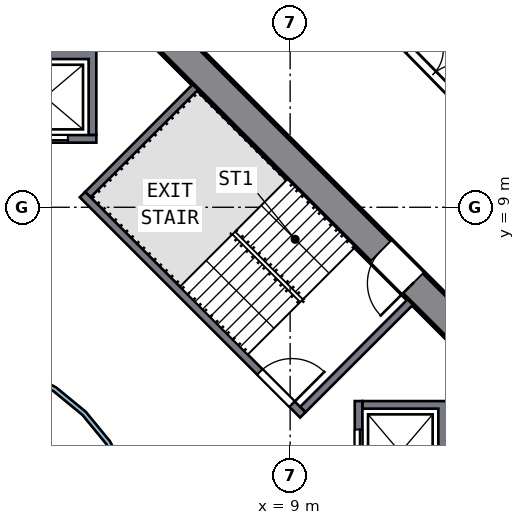
"""IFC4 building model, lengths in metres.
Left out: names, types, materials, properties, quantities, classifications, styles, units other than length and angle.
Written with IfcOpenShell. Run it as: python <this file> out.ifc"""

import sys

from ifc_helpers import new_model, si_unit, direction, frame, frame_2d, origin, place, context, subcontext, project, spatial, polyline, rectangle, outline, extrude, element, fill, save


model = new_model("IFC4")
c1 = context("Model", 3, precision=1e-05, world=origin(), true_north=direction((0.0, 1.0)))
c2 = subcontext(c1, "Body", "Model", "MODEL_VIEW")
j1 = project(units=[si_unit("LENGTHUNIT", "METRE"), si_unit("PLANEANGLEUNIT", "RADIAN")], contexts=[c1])
p1 = place(None, origin())
s1 = spatial("IfcSite", under=j1, at=p1, CompositionType="ELEMENT")
p2 = place(p1, origin())
s2 = spatial("IfcBuilding", under=s1, at=p2, CompositionType="ELEMENT")
p3 = place(p2, frame((0.0, 0.0, 93.0)))
s3 = spatial("IfcBuildingStorey", under=s2, at=p3, CompositionType="ELEMENT", Elevation=93.0)
p4 = place(p3, frame((13.717, 5.516, 0.0), z_axis=(0.0, 0.0, 1.0), x_axis=(-0.707106781, 0.707106781, 0.0)))
e1 = element("IfcWall", 1, at=p4, inside=s3, PredefinedType="SHEAR", context=c2, shape_type="SweptSolid", body=[
    extrude(rectangle(XDim=11.598, YDim=0.8, at=frame_2d((5.799, 0.0))), origin(), (0.0, 0.0, 1.0), 3.5),
])
p5 = place(p4, frame((2.099, 0.0, 0.0)))
e2 = element("IfcOpeningElement", 2, at=p5, cuts=e1, PredefinedType="OPENING", context=c2, shape_type="SweptSolid", body=[
    extrude(rectangle(XDim=1.2, YDim=2.1, at=frame_2d((0.6, 1.05))), frame((0.0, 0.41, 0.0), z_axis=(0.0, -1.0, 0.0), x_axis=(1.0, 0.0, 0.0)), (0.0, 0.0, 1.0), 0.82),
])
p6 = place(p3, frame((8.211, 17.139, 0.0), z_axis=(0.0, 0.0, 1.0), x_axis=(0.699668735, -0.714467397, 0.0)))
e3 = element("IfcWall", 3, at=p6, inside=s3, PredefinedType="SOLIDWALL", context=c2, shape_type="SweptSolid", body=[
    extrude(rectangle(XDim=13.0, YDim=0.2, at=frame_2d((6.5, 0.0))), origin(), (0.0, 0.0, 1.0), 3.19),
])
p7 = place(p6, frame((5.6, 0.0, 0.0)))
e4 = element("IfcOpeningElement", 4, at=p7, cuts=e3, PredefinedType="OPENING", context=c2, shape_type="SweptSolid", body=[
    extrude(rectangle(XDim=1.8, YDim=2.4, at=frame_2d((0.9, 1.2))), frame((0.0, 0.11, 0.0), z_axis=(0.0, -1.0, 0.0), x_axis=(1.0, 0.0, 0.0)), (0.0, 0.0, 1.0), 0.22),
])
p8 = place(p3, frame((21.788, 12.351, 0.0), z_axis=(0.0, 0.0, 1.0), x_axis=(-0.699662003, 0.71447399, 0.0)))
e5 = element("IfcWall", 5, at=p8, inside=s3, PredefinedType="SOLIDWALL", context=c2, shape_type="SweptSolid", body=[
    extrude(rectangle(XDim=12.84, YDim=0.1, at=frame_2d((6.42, 0.0))), origin(), (0.0, 0.0, 1.0), 0.7),
])
p9 = place(p3, origin())
e6 = element("IfcWall", 6, at=p9, inside=s3, PredefinedType="SOLIDWALL", context=c2, shape_type="SweptSolid", body=[
    extrude(outline(polyline([(13.2, 3.9), (13.2, 1.2), (10.9, 1.2), (10.9, 1.4), (12.9, 1.4), (12.9, 3.7), (10.9, 3.7), (10.9, 3.9), (13.2, 3.9)])), origin(), (0.0, 0.0, 1.0), 3.19),
])
p10 = place(p3, frame((10.8, 1.2, 0.0), z_axis=(0.0, 0.0, 1.0), x_axis=(0.0, 1.0, 0.0)))
e7 = element("IfcWall", 7, at=p10, inside=s3, PredefinedType="SOLIDWALL", context=c2, shape_type="SweptSolid", body=[
    extrude(rectangle(XDim=2.7, YDim=0.2, at=frame_2d((1.35, 0.0))), origin(), (0.0, 0.0, 1.0), 3.19),
])
p11 = place(p10, frame((0.75, 0.0, 0.0)))
e8 = element("IfcOpeningElement", 8, at=p11, cuts=e7, PredefinedType="OPENING", context=c2, shape_type="SweptSolid", body=[
    extrude(rectangle(XDim=1.2, YDim=2.1, at=frame_2d((0.6, 1.05))), frame((0.0, 0.11, 0.0), z_axis=(0.0, -1.0, 0.0), x_axis=(1.0, 0.0, 0.0)), (0.0, 0.0, 1.0), 0.22),
])
p12 = place(p3, origin())
e9 = element("IfcWall", 9, at=p12, inside=s3, PredefinedType="SOLIDWALL", context=c2, shape_type="SweptSolid", body=[
    extrude(outline(polyline([(3.9, 13.2), (3.9, 10.9), (3.7, 10.9), (3.7, 12.9), (1.4, 12.9), (1.4, 10.9), (1.2, 10.9), (1.2, 13.2), (3.9, 13.2)])), origin(), (0.0, 0.0, 1.0), 3.19),
])
p13 = place(p3, frame((1.2, 10.8, 0.0), z_axis=(0.0, 0.0, 1.0), x_axis=(1.0, 0.0, 0.0)))
e10 = element("IfcWall", 10, at=p13, inside=s3, PredefinedType="SOLIDWALL", context=c2, shape_type="SweptSolid", body=[
    extrude(rectangle(XDim=2.7, YDim=0.2, at=frame_2d((1.35, 0.0))), origin(), (0.0, 0.0, 1.0), 3.19),
])
p14 = place(p13, frame((0.75, 0.0, 0.0)))
e11 = element("IfcOpeningElement", 11, at=p14, cuts=e10, PredefinedType="OPENING", context=c2, shape_type="SweptSolid", body=[
    extrude(rectangle(XDim=1.2, YDim=2.1, at=frame_2d((0.6, 1.05))), frame((0.0, 0.11, 0.0), z_axis=(0.0, -1.0, 0.0), x_axis=(1.0, 0.0, 0.0)), (0.0, 0.0, 1.0), 0.22),
])
p15 = place(p3, frame((3.535, 9.334, 0.0), z_axis=(0.0, 0.0, 1.0), x_axis=(0.707106781, -0.707106781, 0.0)))
e12 = element("IfcWall", 12, at=p15, inside=s3, PredefinedType="SOLIDWALL", context=c2, shape_type="SweptSolid", body=[
    extrude(rectangle(XDim=8.2, YDim=0.2, at=frame_2d((4.1, 0.0))), origin(), (0.0, 0.0, 1.0), 3.19),
])
p16 = place(p15, frame((6.6, 0.0, 0.0)))
e13 = element("IfcOpeningElement", 13, at=p16, cuts=e12, PredefinedType="OPENING", context=c2, shape_type="SweptSolid", body=[
    extrude(rectangle(XDim=1.2, YDim=2.1, at=frame_2d((0.6, 1.05))), frame((0.0, 0.11, 0.0), z_axis=(0.0, -1.0, 0.0), x_axis=(1.0, 0.0, 0.0)), (0.0, 0.0, 1.0), 0.22),
])
for number, where, z_axis, x_axis in (
    (14, (9.334, 3.677, 0.0), (0.0, 0.0, 1.0), (0.707, 0.707, 0.0)),
    (15, (3.677, 9.334, 0.0), (0.0, 0.0, 1.0), (0.707, 0.707, 0.0)),
):
    element("IfcWall", number, at=place(p3, frame(where, z_axis=z_axis, x_axis=x_axis)), inside=s3, PredefinedType="SOLIDWALL", context=c2, shape_type="SweptSolid", body=[
        extrude(rectangle(XDim=4.0, YDim=0.2, at=frame_2d((2.0, 0.0))), origin(), (0.0, 0.0, 1.0), 3.19),
    ])
p17 = place(p3, origin())
e16 = element("IfcWall", 16, at=p17, inside=s3, PredefinedType="SOLIDWALL", context=c2, shape_type="SweptSolid", body=[
    extrude(outline(polyline([(5.021, -0.999), (4.73, -1.959), (4.257, -2.844), (3.62, -3.62), (2.844, -4.257), (1.959, -4.73), (0.999, -5.021), (0.0, -5.12), (-0.999, -5.021), (-1.959, -4.73), (-2.844, -4.257), (-3.62, -3.62), (-4.257, -2.844), (-4.73, -1.959), (-5.021, -0.999), (-5.12, 0.0), (-5.021, 0.999), (-4.73, 1.959), (-4.257, 2.844), (-3.62, 3.62), (-2.844, 4.257), (-1.959, 4.73), (-0.999, 5.021), (0.0, 5.12), (0.999, 5.021), (1.959, 4.73), (2.844, 4.257), (3.62, 3.62), (4.257, 2.844), (4.73, 1.959), (5.021, 0.999), (5.12, 0.0), (5.021, -0.999)]), holes=[polyline([(4.904, 0.976), (4.619, 1.913), (4.157, 2.778), (3.535, 3.535), (2.778, 4.157), (1.913, 4.619), (0.976, 4.904), (0.0, 5.0), (-0.976, 4.904), (-1.913, 4.619), (-2.778, 4.157), (-3.535, 3.535), (-4.157, 2.778), (-4.619, 1.913), (-4.904, 0.976), (-5.0, 0.0), (-4.904, -0.976), (-4.619, -1.913), (-4.157, -2.778), (-3.535, -3.535), (-2.778, -4.157), (-1.913, -4.619), (-0.976, -4.904), (0.0, -5.0), (0.976, -4.904), (1.913, -4.619), (2.778, -4.157), (3.535, -3.535), (4.157, -2.778), (4.619, -1.913), (4.904, -0.976), (5.0, 0.0), (4.904, 0.976)])]), origin(), (0.0, 0.0, 1.0), 3.19),
])
p18 = place(p7, origin())
e17 = element("IfcDoor", 17, at=p18, inside=s3, OperationType="DOUBLE_DOOR_SINGLE_SWING", PredefinedType="DOOR", context=c2, shape_type="SweptSolid", body=[
    extrude(rectangle(XDim=1.8, YDim=2.4, at=frame_2d((0.9, 1.2))), frame((0.0, 0.025, 0.0), z_axis=(0.0, -1.0, 0.0), x_axis=(1.0, 0.0, 0.0)), (0.0, 0.0, 1.0), 0.05),
])
fill(e4, e17)
p19 = place(p11, origin())
e18 = element("IfcDoor", 18, at=p19, inside=s3, OperationType="DOUBLE_DOOR_SLIDING", PredefinedType="DOOR", context=c2, shape_type="SweptSolid", body=[
    extrude(rectangle(XDim=1.2, YDim=2.1, at=frame_2d((0.6, 1.05))), frame((0.0, 0.025, 0.0), z_axis=(0.0, -1.0, 0.0), x_axis=(1.0, 0.0, 0.0)), (0.0, 0.0, 1.0), 0.05),
])
fill(e8, e18)
p20 = place(p14, origin())
e19 = element("IfcDoor", 19, at=p20, inside=s3, OperationType="DOUBLE_DOOR_SLIDING", PredefinedType="DOOR", context=c2, shape_type="SweptSolid", body=[
    extrude(rectangle(XDim=1.2, YDim=2.1, at=frame_2d((0.6, 1.05))), frame((0.0, 0.025, 0.0), z_axis=(0.0, -1.0, 0.0), x_axis=(1.0, 0.0, 0.0)), (0.0, 0.0, 1.0), 0.05),
])
fill(e11, e19)
p21 = place(p16, origin())
e20 = element("IfcDoor", 20, at=p21, inside=s3, OperationType="SINGLE_SWING_RIGHT", PredefinedType="DOOR", context=c2, shape_type="SweptSolid", body=[
    extrude(rectangle(XDim=1.2, YDim=2.1, at=frame_2d((0.6, 1.05))), frame((0.0, 0.025, 0.0), z_axis=(0.0, -1.0, 0.0), x_axis=(1.0, 0.0, 0.0)), (0.0, 0.0, 1.0), 0.05),
])
fill(e13, e20)
p22 = place(p5, origin())
e21 = element("IfcDoor", 21, at=p22, inside=s3, OperationType="SINGLE_SWING_LEFT", PredefinedType="DOOR", context=c2, shape_type="SweptSolid", body=[
    extrude(rectangle(XDim=1.2, YDim=2.1, at=frame_2d((0.6, 1.05))), frame((0.0, 0.025, 0.0), z_axis=(0.0, -1.0, 0.0), x_axis=(1.0, 0.0, 0.0)), (0.0, 0.0, 1.0), 0.05),
])
fill(e2, e21)
save(model, sys.argv[1])
